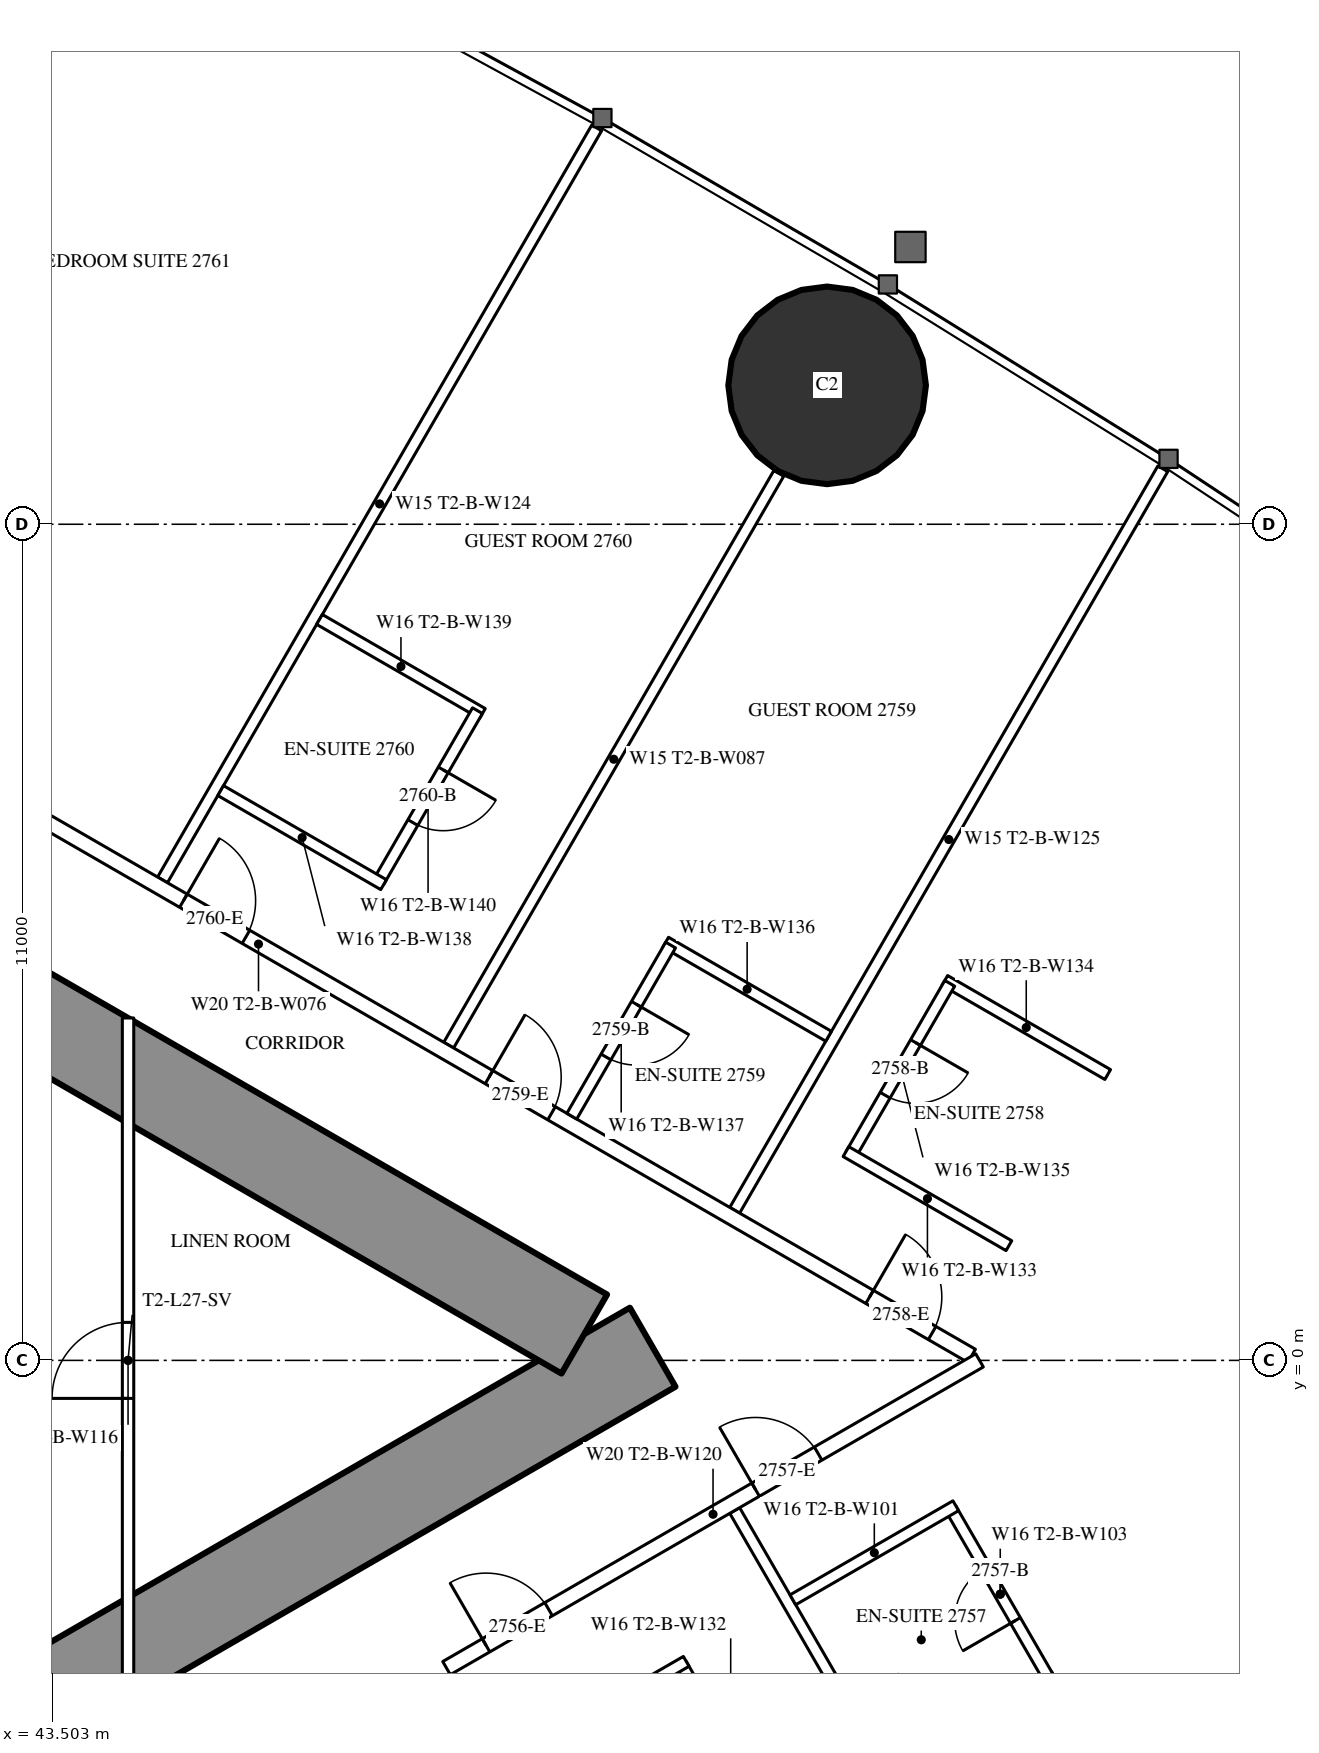
"""IFC4 building model, lengths in metres.
Left out: names, types, materials, properties, quantities, classifications, styles, units other than length and angle.
Written with IfcOpenShell. Run it as: python <this file> out.ifc"""

import sys

from ifc_helpers import new_model, si_unit, direction, frame, frame_2d, origin, origin_2d, place, context, subcontext, project, spatial, rectangle, hollow_circle, extrude, element, fill, save


model = new_model("IFC4")
c1 = context("Model", 3, precision=1e-05, world=origin(), true_north=direction((0.0, 1.0)))
c2 = subcontext(c1, "Body", "Model", "MODEL_VIEW")
j1 = project(units=[si_unit("LENGTHUNIT", "METRE"), si_unit("PLANEANGLEUNIT", "RADIAN")], contexts=[c1])
p1 = place(None, origin())
s1 = spatial("IfcSite", under=j1, at=p1, CompositionType="ELEMENT")
p2 = place(p1, origin())
s2 = spatial("IfcBuilding", under=s1, at=p2, CompositionType="ELEMENT")
p3 = place(p2, frame((0.0, 0.0, 104.6)))
s3 = spatial("IfcBuildingStorey", under=s2, at=p3, CompositionType="ELEMENT", Elevation=104.6)
p4 = place(p3, frame((53.697, 12.827, 0.0), z_axis=(0.0, 0.0, 1.0), x_axis=(1.0, 0.0, 0.0)))
e1 = element("IfcColumn", 1, at=p4, inside=s3, PredefinedType="COLUMN", context=c2, shape_type="SweptSolid", body=[
    extrude(hollow_circle(Radius=1.3, WallThickness=0.1, at=origin_2d()), origin(), (0.0, 0.0, 1.0), 3.5),
])
p5 = place(p3, frame((27.2, -13.8, 0.0), z_axis=(0.0, 0.0, 1.0), x_axis=(0.866027159892, 0.499996958321, 0.0)))
e2 = element("IfcWall", 2, at=p5, inside=s3, PredefinedType="SHEAR", context=c2, shape_type="SweptSolid", body=[
    extrude(rectangle(XDim=27.947, YDim=1.2, at=frame_2d((13.973, 0.0))), origin(), (0.0, 0.0, 1.0), 3.5),
])
p6 = place(p5, frame((4.6, 0.0, 0.0)))
e3 = element("IfcOpeningElement", 3, at=p6, cuts=e2, PredefinedType="OPENING", context=c2, shape_type="SweptSolid", body=[
    extrude(rectangle(XDim=1.0, YDim=2.2, at=frame_2d((0.5, 1.1))), frame((0.0, 0.61, 0.0), z_axis=(0.0, -1.0, 0.0), x_axis=(1.0, 0.0, 0.0)), (0.0, 0.0, 1.0), 1.22),
])
p7 = place(p5, frame((13.395, 0.0, 0.0)))
e4 = element("IfcOpeningElement", 4, at=p7, cuts=e2, PredefinedType="OPENING", context=c2, shape_type="SweptSolid", body=[
    extrude(rectangle(XDim=1.8, YDim=2.2, at=frame_2d((0.9, 1.1))), frame((0.0, 0.61, 0.0), z_axis=(0.0, -1.0, 0.0), x_axis=(1.0, 0.0, 0.0)), (0.0, 0.0, 1.0), 1.22),
])
p8 = place(p3, frame((27.2, 13.8, 0.0), z_axis=(0.0, 0.0, 1.0), x_axis=(0.866024515034, -0.500001539357, 0.0)))
e5 = element("IfcWall", 5, at=p8, inside=s3, PredefinedType="SHEAR", context=c2, shape_type="SweptSolid", body=[
    extrude(rectangle(XDim=26.907, YDim=1.2, at=frame_2d((13.454, 0.0))), origin(), (0.0, 0.0, 1.0), 3.5),
])
p9 = place(p8, frame((4.6, 0.0, 0.0)))
e6 = element("IfcOpeningElement", 6, at=p9, cuts=e5, PredefinedType="OPENING", context=c2, shape_type="SweptSolid", body=[
    extrude(rectangle(XDim=1.0, YDim=2.2, at=frame_2d((0.5, 1.1))), frame((0.0, 0.61, 0.0), z_axis=(0.0, -1.0, 0.0), x_axis=(1.0, 0.0, 0.0)), (0.0, 0.0, 1.0), 1.22),
])
p10 = place(p8, frame((13.395, 0.0, 0.0)))
e7 = element("IfcOpeningElement", 7, at=p10, cuts=e5, PredefinedType="OPENING", context=c2, shape_type="SweptSolid", body=[
    extrude(rectangle(XDim=1.8, YDim=2.2, at=frame_2d((0.9, 1.1))), frame((0.0, 0.61, 0.0), z_axis=(0.0, -1.0, 0.0), x_axis=(1.0, 0.0, 0.0)), (0.0, 0.0, 1.0), 1.22),
])
p11 = place(p3, frame((48.719, -4.147, 0.0), z_axis=(0.0, 0.0, 1.0), x_axis=(0.499990498062, -0.866030889661, 0.0)))
e8 = element("IfcWall", 8, at=p11, inside=s3, PredefinedType="PARTITIONING", context=c2, shape_type="SweptSolid", body=[
    extrude(rectangle(XDim=11.406, YDim=0.15, at=frame_2d((5.703, 0.0))), origin(), (0.0, 0.0, 1.0), 3.25),
])
p12 = place(p3, frame((52.481, -1.975, 0.0), z_axis=(0.0, 0.0, 1.0), x_axis=(0.500003867771, -0.866023170714, 0.0)))
e9 = element("IfcWall", 9, at=p12, inside=s3, PredefinedType="PARTITIONING", context=c2, shape_type="SweptSolid", body=[
    extrude(rectangle(XDim=11.265, YDim=0.15, at=frame_2d((5.632, 0.0))), origin(), (0.0, 0.0, 1.0), 3.25),
])
p13 = place(p3, frame((44.954, 6.321, 0.0), z_axis=(0.0, 0.0, 1.0), x_axis=(0.500009815811, 0.866019736549, 0.0)))
e10 = element("IfcWall", 10, at=p13, inside=s3, PredefinedType="PARTITIONING", context=c2, shape_type="SweptSolid", body=[
    extrude(rectangle(XDim=11.424, YDim=0.15, at=frame_2d((5.712, 0.0))), origin(), (0.0, 0.0, 1.0), 3.25),
])
p14 = place(p3, frame((48.719, 4.147, 0.0), z_axis=(0.0, 0.0, 1.0), x_axis=(0.499993328235, 0.866029255696, 0.0)))
e11 = element("IfcWall", 11, at=p14, inside=s3, PredefinedType="PARTITIONING", context=c2, shape_type="SweptSolid", body=[
    extrude(rectangle(XDim=8.686, YDim=0.15, at=frame_2d((4.343, 0.0))), origin(), (0.0, 0.0, 1.0), 2.2),
])
p15 = place(p3, frame((52.481, 1.975, 0.0), z_axis=(0.0, 0.0, 1.0), x_axis=(0.500003867771, 0.866023170714, 0.0)))
e12 = element("IfcWall", 12, at=p15, inside=s3, PredefinedType="PARTITIONING", context=c2, shape_type="SweptSolid", body=[
    extrude(rectangle(XDim=11.265, YDim=0.15, at=frame_2d((5.632, 0.0))), origin(), (0.0, 0.0, 1.0), 3.25),
])
p16 = place(p3, frame((36.834, 10.894, 0.0), z_axis=(0.0, 0.0, 1.0), x_axis=(0.866028157229, -0.499995230863, 0.0)))
e13 = element("IfcWall", 13, at=p16, inside=s3, PredefinedType="PARTITIONING", context=c2, shape_type="SweptSolid", body=[
    extrude(rectangle(XDim=21.667, YDim=0.2, at=frame_2d((10.833, 0.0))), origin(), (0.0, 0.0, 1.0), 3.25),
])
p17 = place(p16, frame((20.117, 0.0, 0.0)))
e14 = element("IfcOpeningElement", 14, at=p17, cuts=e13, PredefinedType="OPENING", context=c2, shape_type="SweptSolid", body=[
    extrude(rectangle(XDim=0.95, YDim=2.2, at=frame_2d((0.475, 1.1))), frame((0.0, 0.11, 0.0), z_axis=(0.0, -1.0, 0.0), x_axis=(1.0, 0.0, 0.0)), (0.0, 0.0, 1.0), 0.22),
])
p18 = place(p16, frame((14.335, 0.0, 0.0)))
e15 = element("IfcOpeningElement", 15, at=p18, cuts=e13, PredefinedType="OPENING", context=c2, shape_type="SweptSolid", body=[
    extrude(rectangle(XDim=0.95, YDim=2.2, at=frame_2d((0.475, 1.1))), frame((0.0, 0.11, 0.0), z_axis=(0.0, -1.0, 0.0), x_axis=(1.0, 0.0, 0.0)), (0.0, 0.0, 1.0), 0.22),
])
p19 = place(p16, frame((9.693, 0.0, 0.0)))
e16 = element("IfcOpeningElement", 16, at=p19, cuts=e13, PredefinedType="OPENING", context=c2, shape_type="SweptSolid", body=[
    extrude(rectangle(XDim=0.95, YDim=2.2, at=frame_2d((0.475, 1.1))), frame((0.0, 0.11, 0.0), z_axis=(0.0, -1.0, 0.0), x_axis=(1.0, 0.0, 0.0)), (0.0, 0.0, 1.0), 0.22),
])
p20 = place(p16, frame((2.95, 0.0, 0.0)))
e17 = element("IfcOpeningElement", 17, at=p20, cuts=e13, PredefinedType="OPENING", context=c2, shape_type="SweptSolid", body=[
    extrude(rectangle(XDim=0.95, YDim=2.2, at=frame_2d((0.475, 1.1))), frame((0.0, 0.11, 0.0), z_axis=(0.0, -1.0, 0.0), x_axis=(1.0, 0.0, 0.0)), (0.0, 0.0, 1.0), 0.22),
])
p21 = place(p3, frame((48.69, -4.048, 0.0), z_axis=(0.0, 0.0, 1.0), x_axis=(0.866026410209, 0.499998256818, 0.0)))
e18 = element("IfcWall", 18, at=p21, inside=s3, PredefinedType="PARTITIONING", context=c2, shape_type="SweptSolid", body=[
    extrude(rectangle(XDim=8.097, YDim=0.2, at=frame_2d((4.048, 0.0))), origin(), (0.0, 0.0, 1.0), 3.25),
])
p22 = place(p21, frame((0.6, 0.0, 0.0)))
e19 = element("IfcOpeningElement", 19, at=p22, cuts=e18, PredefinedType="OPENING", context=c2, shape_type="SweptSolid", body=[
    extrude(rectangle(XDim=0.95, YDim=2.2, at=frame_2d((0.475, 1.1))), frame((0.0, 0.11, 0.0), z_axis=(0.0, -1.0, 0.0), x_axis=(1.0, 0.0, 0.0)), (0.0, 0.0, 1.0), 0.22),
])
p23 = place(p21, frame((4.695, 0.0, 0.0)))
e20 = element("IfcOpeningElement", 20, at=p23, cuts=e18, PredefinedType="OPENING", context=c2, shape_type="SweptSolid", body=[
    extrude(rectangle(XDim=0.95, YDim=2.2, at=frame_2d((0.475, 1.1))), frame((0.0, 0.11, 0.0), z_axis=(0.0, -1.0, 0.0), x_axis=(1.0, 0.0, 0.0)), (0.0, 0.0, 1.0), 0.22),
])
p24 = place(p3, frame((51.778, -3.998, 0.0), z_axis=(0.0, 0.0, 1.0), x_axis=(0.500047596559, -0.865997922154, 0.0)))
e21 = element("IfcWall", 21, at=p24, inside=s3, PredefinedType="PARTITIONING", context=c2, shape_type="SweptSolid", body=[
    extrude(rectangle(XDim=2.6, YDim=0.15, at=frame_2d((1.3, 0.0))), origin(), (0.0, 0.0, 1.0), 3.25),
])
p25 = place(p24, frame((0.9, 0.0, 0.0)))
e22 = element("IfcOpeningElement", 22, at=p25, cuts=e21, PredefinedType="OPENING", context=c2, shape_type="SweptSolid", body=[
    extrude(rectangle(XDim=0.8, YDim=2.2, at=frame_2d((0.4, 1.1))), frame((0.0, 0.085, 0.0), z_axis=(0.0, -1.0, 0.0), x_axis=(1.0, 0.0, 0.0)), (0.0, 0.0, 1.0), 0.17),
])
for number, where, z_axis, x_axis in (
    (23, (49.7, -5.198, 0.0), (0.0, 0.0, 1.0), (0.866, 0.5, 0.0)),
    (24, (54.546, -5.402, 0.0), (0.0, 0.0, 1.0), (0.866, 0.5, 0.0)),
):
    element("IfcWall", number, at=place(p3, frame(where, z_axis=z_axis, x_axis=x_axis)), inside=s3, PredefinedType="PARTITIONING", context=c2, shape_type="SweptSolid", body=[
        extrude(rectangle(XDim=2.475, YDim=0.15, at=frame_2d((1.237, 0.0))), origin(), (0.0, 0.0, 1.0), 3.25),
    ])
p26 = place(p3, frame((55.325, -1.95, 0.0), z_axis=(0.0, 0.0, 1.0), x_axis=(0.500006934395, -0.866021400173, 0.0)))
e25 = element("IfcWall", 25, at=p26, inside=s3, PredefinedType="PARTITIONING", context=c2, shape_type="SweptSolid", body=[
    extrude(rectangle(XDim=2.6, YDim=0.15, at=frame_2d((1.3, 0.0))), origin(), (0.0, 0.0, 1.0), 3.25),
])
p27 = place(p26, frame((0.9, 0.0, 0.0)))
e26 = element("IfcOpeningElement", 26, at=p27, cuts=e25, PredefinedType="OPENING", context=c2, shape_type="SweptSolid", body=[
    extrude(rectangle(XDim=0.8, YDim=2.2, at=frame_2d((0.4, 1.1))), frame((0.0, 0.085, 0.0), z_axis=(0.0, -1.0, 0.0), x_axis=(1.0, 0.0, 0.0)), (0.0, 0.0, 1.0), 0.17),
])
for number, where, z_axis, x_axis in (
    (27, (53.246, -3.15, 0.0), (0.0, 0.0, 1.0), (0.866, 0.5, 0.0)),
    (28, (55.245, 4.998, 0.0), (0.0, 0.0, 1.0), (0.866, -0.5, 0.0)),
):
    element("IfcWall", number, at=place(p3, frame(where, z_axis=z_axis, x_axis=x_axis)), inside=s3, PredefinedType="PARTITIONING", context=c2, shape_type="SweptSolid", body=[
        extrude(rectangle(XDim=2.475, YDim=0.15, at=frame_2d((1.237, 0.0))), origin(), (0.0, 0.0, 1.0), 3.25),
    ])
p28 = place(p3, frame((54.01, 2.709, 0.0), z_axis=(0.0, 0.0, 1.0), x_axis=(0.500006934395, 0.866021400173, 0.0)))
e29 = element("IfcWall", 29, at=p28, inside=s3, PredefinedType="PARTITIONING", context=c2, shape_type="SweptSolid", body=[
    extrude(rectangle(XDim=2.6, YDim=0.15, at=frame_2d((1.3, 0.0))), origin(), (0.0, 0.0, 1.0), 3.25),
])
p29 = place(p28, frame((0.9, 0.0, 0.0)))
e30 = element("IfcOpeningElement", 30, at=p29, cuts=e29, PredefinedType="OPENING", context=c2, shape_type="SweptSolid", body=[
    extrude(rectangle(XDim=0.8, YDim=2.2, at=frame_2d((0.4, 1.1))), frame((0.0, 0.085, 0.0), z_axis=(0.0, -1.0, 0.0), x_axis=(1.0, 0.0, 0.0)), (0.0, 0.0, 1.0), 0.17),
])
p30 = place(p3, frame((53.945, 2.747, 0.0), z_axis=(0.0, 0.0, 1.0), x_axis=(0.866031185235, -0.4999899861, 0.0)))
e31 = element("IfcWall", 31, at=p30, inside=s3, PredefinedType="PARTITIONING", context=c2, shape_type="SweptSolid", body=[
    extrude(rectangle(XDim=2.475, YDim=0.15, at=frame_2d((1.238, 0.0))), origin(), (0.0, 0.0, 1.0), 3.25),
])
p31 = place(p3, frame((51.573, 5.502, 0.0), z_axis=(0.0, 0.0, 1.0), x_axis=(0.866006523861, -0.500032699561, 0.0)))
e32 = element("IfcWall", 32, at=p31, inside=s3, PredefinedType="PARTITIONING", context=c2, shape_type="SweptSolid", body=[
    extrude(rectangle(XDim=2.475, YDim=0.15, at=frame_2d((1.237, 0.0))), origin(), (0.0, 0.0, 1.0), 3.25),
])
p32 = place(p3, frame((50.338, 3.213, 0.0), z_axis=(0.0, 0.0, 1.0), x_axis=(0.500047596559, 0.865997922154, 0.0)))
e33 = element("IfcWall", 33, at=p32, inside=s3, PredefinedType="PARTITIONING", context=c2, shape_type="SweptSolid", body=[
    extrude(rectangle(XDim=2.6, YDim=0.15, at=frame_2d((1.3, 0.0))), origin(), (0.0, 0.0, 1.0), 3.25),
])
p33 = place(p32, frame((0.9, 0.0, 0.0)))
e34 = element("IfcOpeningElement", 34, at=p33, cuts=e33, PredefinedType="OPENING", context=c2, shape_type="SweptSolid", body=[
    extrude(rectangle(XDim=0.8, YDim=2.2, at=frame_2d((0.4, 1.1))), frame((0.0, 0.085, 0.0), z_axis=(0.0, -1.0, 0.0), x_axis=(1.0, 0.0, 0.0)), (0.0, 0.0, 1.0), 0.17),
])
p34 = place(p3, frame((47.019, 9.748, 0.0), z_axis=(0.0, 0.0, 1.0), x_axis=(0.866006523861, -0.500032699561, 0.0)))
e35 = element("IfcWall", 35, at=p34, inside=s3, PredefinedType="PARTITIONING", context=c2, shape_type="SweptSolid", body=[
    extrude(rectangle(XDim=2.475, YDim=0.15, at=frame_2d((1.237, 0.0))), origin(), (0.0, 0.0, 1.0), 3.25),
])
p35 = place(p3, frame((47.797, 6.296, 0.0), z_axis=(0.0, 0.0, 1.0), x_axis=(0.499936506574, 0.866062058628, 0.0)))
e36 = element("IfcWall", 36, at=p35, inside=s3, PredefinedType="PARTITIONING", context=c2, shape_type="SweptSolid", body=[
    extrude(rectangle(XDim=2.6, YDim=0.15, at=frame_2d((1.3, 0.0))), origin(), (0.0, 0.0, 1.0), 3.25),
])
p36 = place(p35, frame((0.9, 0.0, 0.0)))
e37 = element("IfcOpeningElement", 37, at=p36, cuts=e36, PredefinedType="OPENING", context=c2, shape_type="SweptSolid", body=[
    extrude(rectangle(XDim=0.8, YDim=2.2, at=frame_2d((0.4, 1.1))), frame((0.0, 0.085, 0.0), z_axis=(0.0, -1.0, 0.0), x_axis=(1.0, 0.0, 0.0)), (0.0, 0.0, 1.0), 0.17),
])
p37 = place(p3, frame((45.719, 7.496, 0.0), z_axis=(0.0, 0.0, 1.0), x_axis=(0.866031185235, -0.4999899861, 0.0)))
e38 = element("IfcWall", 38, at=p37, inside=s3, PredefinedType="PARTITIONING", context=c2, shape_type="SweptSolid", body=[
    extrude(rectangle(XDim=2.475, YDim=0.15, at=frame_2d((1.238, 0.0))), origin(), (0.0, 0.0, 1.0), 3.25),
])
p38 = place(p3, frame((44.5, -4.505, 0.0), z_axis=(0.0, 0.0, 1.0), x_axis=(0.0, 1.0, 0.0)))
e39 = element("IfcWall", 39, at=p38, inside=s3, PredefinedType="PARTITIONING", context=c2, shape_type="SweptSolid", body=[
    extrude(rectangle(XDim=9.009, YDim=0.15, at=frame_2d((4.505, 0.0))), origin(), (0.0, 0.0, 1.0), 2.45),
])
p39 = place(p38, frame((4.005, 0.0, 0.0)))
e40 = element("IfcOpeningElement", 40, at=p39, cuts=e39, PredefinedType="OPENING", context=c2, shape_type="SweptSolid", body=[
    extrude(rectangle(XDim=1.0, YDim=2.2, at=frame_2d((0.5, 1.1))), frame((0.0, 0.085, 0.0), z_axis=(0.0, -1.0, 0.0), x_axis=(1.0, 0.0, 0.0)), (0.0, 0.0, 1.0), 0.17),
])
p40 = place(p22, origin())
e41 = element("IfcDoor", 41, at=p40, inside=s3, OperationType="SINGLE_SWING_LEFT", PredefinedType="DOOR", context=c2, shape_type="SweptSolid", body=[
    extrude(rectangle(XDim=0.95, YDim=2.2, at=frame_2d((0.475, 1.1))), frame((0.0, 0.025, 0.0), z_axis=(0.0, -1.0, 0.0), x_axis=(1.0, 0.0, 0.0)), (0.0, 0.0, 1.0), 0.05),
])
fill(e19, e41)
p41 = place(p27, origin())
e42 = element("IfcDoor", 42, at=p41, inside=s3, OperationType="SINGLE_SWING_RIGHT", PredefinedType="DOOR", context=c2, shape_type="SweptSolid", body=[
    extrude(rectangle(XDim=0.8, YDim=2.2, at=frame_2d((0.4, 1.1))), frame((0.0, 0.025, 0.0), z_axis=(0.0, -1.0, 0.0), x_axis=(1.0, 0.0, 0.0)), (0.0, 0.0, 1.0), 0.05),
])
fill(e26, e42)
p42 = place(p23, origin())
e43 = element("IfcDoor", 43, at=p42, inside=s3, OperationType="SINGLE_SWING_LEFT", PredefinedType="DOOR", context=c2, shape_type="SweptSolid", body=[
    extrude(rectangle(XDim=0.95, YDim=2.2, at=frame_2d((0.475, 1.1))), frame((0.0, 0.025, 0.0), z_axis=(0.0, -1.0, 0.0), x_axis=(1.0, 0.0, 0.0)), (0.0, 0.0, 1.0), 0.05),
])
fill(e20, e43)
p43 = place(p29, origin())
e44 = element("IfcDoor", 44, at=p43, inside=s3, OperationType="SINGLE_SWING_RIGHT", PredefinedType="DOOR", context=c2, shape_type="SweptSolid", body=[
    extrude(rectangle(XDim=0.8, YDim=2.2, at=frame_2d((0.4, 1.1))), frame((0.0, 0.025, 0.0), z_axis=(0.0, -1.0, 0.0), x_axis=(1.0, 0.0, 0.0)), (0.0, 0.0, 1.0), 0.05),
])
fill(e30, e44)
p44 = place(p17, origin())
e45 = element("IfcDoor", 45, at=p44, inside=s3, OperationType="SINGLE_SWING_LEFT", PredefinedType="DOOR", context=c2, shape_type="SweptSolid", body=[
    extrude(rectangle(XDim=0.95, YDim=2.2, at=frame_2d((0.475, 1.1))), frame((0.0, 0.025, 0.0), z_axis=(0.0, -1.0, 0.0), x_axis=(1.0, 0.0, 0.0)), (0.0, 0.0, 1.0), 0.05),
])
fill(e14, e45)
p45 = place(p33, origin())
e46 = element("IfcDoor", 46, at=p45, inside=s3, OperationType="SINGLE_SWING_RIGHT", PredefinedType="DOOR", context=c2, shape_type="SweptSolid", body=[
    extrude(rectangle(XDim=0.8, YDim=2.2, at=frame_2d((0.4, 1.1))), frame((0.0, 0.025, 0.0), z_axis=(0.0, -1.0, 0.0), x_axis=(1.0, 0.0, 0.0)), (0.0, 0.0, 1.0), 0.05),
])
fill(e34, e46)
p46 = place(p18, origin())
e47 = element("IfcDoor", 47, at=p46, inside=s3, OperationType="SINGLE_SWING_LEFT", PredefinedType="DOOR", context=c2, shape_type="SweptSolid", body=[
    extrude(rectangle(XDim=0.95, YDim=2.2, at=frame_2d((0.475, 1.1))), frame((0.0, 0.025, 0.0), z_axis=(0.0, -1.0, 0.0), x_axis=(1.0, 0.0, 0.0)), (0.0, 0.0, 1.0), 0.05),
])
fill(e15, e47)
p47 = place(p36, origin())
e48 = element("IfcDoor", 48, at=p47, inside=s3, OperationType="SINGLE_SWING_RIGHT", PredefinedType="DOOR", context=c2, shape_type="SweptSolid", body=[
    extrude(rectangle(XDim=0.8, YDim=2.2, at=frame_2d((0.4, 1.1))), frame((0.0, 0.025, 0.0), z_axis=(0.0, -1.0, 0.0), x_axis=(1.0, 0.0, 0.0)), (0.0, 0.0, 1.0), 0.05),
])
fill(e37, e48)
p48 = place(p19, origin())
e49 = element("IfcDoor", 49, at=p48, inside=s3, OperationType="SINGLE_SWING_LEFT", PredefinedType="DOOR", context=c2, shape_type="SweptSolid", body=[
    extrude(rectangle(XDim=0.95, YDim=2.2, at=frame_2d((0.475, 1.1))), frame((0.0, 0.025, 0.0), z_axis=(0.0, -1.0, 0.0), x_axis=(1.0, 0.0, 0.0)), (0.0, 0.0, 1.0), 0.05),
])
fill(e16, e49)
p49 = place(p39, origin())
e50 = element("IfcDoor", 50, at=p49, inside=s3, OperationType="SINGLE_SWING_LEFT", PredefinedType="DOOR", context=c2, shape_type="SweptSolid", body=[
    extrude(rectangle(XDim=1.0, YDim=2.2, at=frame_2d((0.5, 1.1))), frame((0.0, 0.025, 0.0), z_axis=(0.0, -1.0, 0.0), x_axis=(1.0, 0.0, 0.0)), (0.0, 0.0, 1.0), 0.05),
])
fill(e40, e50)
save(model, sys.argv[1])
